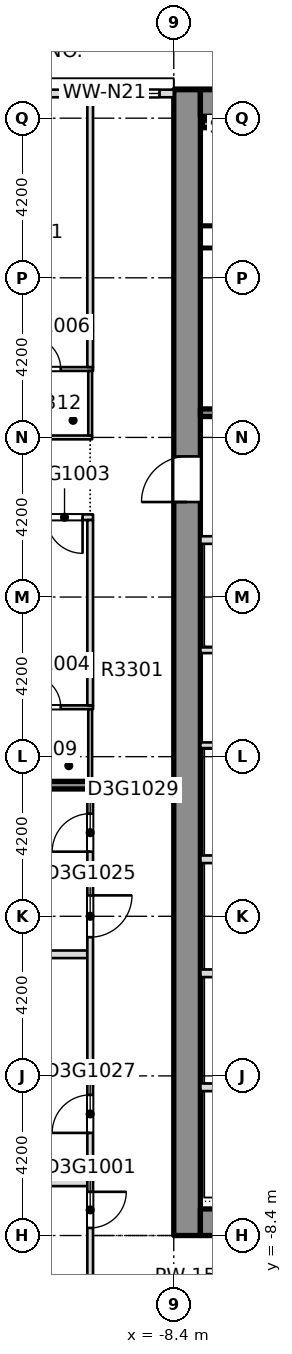
"""IFC4 building model, lengths in metres.
Left out: names, types, materials, properties, quantities, classifications, styles, units other than length and angle.
Written with IfcOpenShell. Run it as: python <this file> out.ifc"""

import sys

from ifc_helpers import new_model, si_unit, direction, frame, frame_2d, origin, place, context, subcontext, project, spatial, rectangle, extrude, element, fill, save


model = new_model("IFC4")
c1 = context("Model", 3, precision=1e-05, world=origin(), true_north=direction((0.0, 1.0)))
c2 = subcontext(c1, "Body", "Model", "MODEL_VIEW")
j1 = project(units=[si_unit("LENGTHUNIT", "METRE"), si_unit("PLANEANGLEUNIT", "RADIAN")], contexts=[c1])
p1 = place(None, origin())
s1 = spatial("IfcSite", under=j1, at=p1, CompositionType="ELEMENT")
p2 = place(p1, origin())
s2 = spatial("IfcBuilding", under=s1, at=p2, CompositionType="ELEMENT")
p3 = place(p2, frame((0.0, 0.0, 133.1)))
s3 = spatial("IfcBuildingStorey", under=s2, at=p3, CompositionType="ELEMENT", Elevation=133.1)
p4 = place(p3, frame((-8.05, -8.4, -0.4), z_axis=(0.0, 0.0, 1.0), x_axis=(0.0, 1.0, 0.0)))
e1 = element("IfcWall", 1, at=p4, inside=s3, PredefinedType="SOLIDWALL", context=c2, shape_type="SweptSolid", body=[
    extrude(rectangle(XDim=30.15, YDim=0.7, at=frame_2d((15.075, 0.0))), origin(), (0.0, 0.0, 1.0), 3.45),
])
p5 = place(p4, frame((19.3, 0.0, 0.4)))
e2 = element("IfcOpeningElement", 2, at=p5, cuts=e1, PredefinedType="OPENING", context=c2, shape_type="SweptSolid", body=[
    extrude(rectangle(XDim=1.2, YDim=2.1, at=frame_2d((0.6, 1.05))), frame((0.0, 0.36, 0.0), z_axis=(0.0, -1.0, 0.0), x_axis=(1.0, 0.0, 0.0)), (0.0, 0.0, 1.0), 0.72),
])
p6 = place(p3, frame((-7.7, -8.05, -0.4), z_axis=(0.0, 0.0, 1.0), x_axis=(1.0, 0.0, 0.0)))
e3 = element("IfcWall", 3, at=p6, inside=s3, PredefinedType="SHEAR", context=c2, shape_type="SweptSolid", body=[
    extrude(rectangle(XDim=15.4, YDim=0.7, at=frame_2d((7.7, 0.0))), origin(), (0.0, 0.0, 1.0), 3.45),
])
p7 = place(p6, frame((2.95, 0.0, 0.4)))
e4 = element("IfcOpeningElement", 4, at=p7, cuts=e3, PredefinedType="OPENING", context=c2, shape_type="SweptSolid", body=[
    extrude(rectangle(XDim=1.8, YDim=2.1, at=frame_2d((0.9, 1.05))), frame((0.0, 0.36, 0.0), z_axis=(0.0, -1.0, 0.0), x_axis=(1.0, 0.0, 0.0)), (0.0, 0.0, 1.0), 0.72),
])
p8 = place(p6, frame((10.65, 0.0, 0.4)))
e5 = element("IfcOpeningElement", 5, at=p8, cuts=e3, PredefinedType="OPENING", context=c2, shape_type="SweptSolid", body=[
    extrude(rectangle(XDim=1.8, YDim=2.1, at=frame_2d((0.9, 1.05))), frame((0.0, 0.36, 0.0), z_axis=(0.0, -1.0, 0.0), x_axis=(1.0, 0.0, 0.0)), (0.0, 0.0, 1.0), 0.72),
])
p9 = place(p3, frame((-7.7, 21.4, -0.4), z_axis=(0.0, 0.0, 1.0), x_axis=(1.0, 0.0, 0.0)))
e6 = element("IfcWall", 6, at=p9, inside=s3, PredefinedType="SHEAR", context=c2, shape_type="SweptSolid", body=[
    extrude(rectangle(XDim=15.4, YDim=0.7, at=frame_2d((7.7, 0.0))), origin(), (0.0, 0.0, 1.0), 3.45),
])
p10 = place(p3, frame((-21.55, -7.0, 0.0), z_axis=(0.0, 0.0, 1.0), x_axis=(1.0, 0.0, 0.0)))
e7 = element("IfcWall", 7, at=p10, inside=s3, PredefinedType="PARTITIONING", context=c2, shape_type="SweptSolid", body=[
    extrude(rectangle(XDim=10.875, YDim=0.2, at=frame_2d((5.438, 0.0))), origin(), (0.0, 0.0, 1.0), 3.05),
])
p11 = place(p3, frame((-16.748, -1.0, 0.0), z_axis=(0.0, 0.0, 1.0), x_axis=(1.0, 0.0, 0.0)))
e8 = element("IfcWall", 8, at=p11, inside=s3, PredefinedType="PARTITIONING", context=c2, shape_type="SweptSolid", body=[
    extrude(rectangle(XDim=6.071, YDim=0.2, at=frame_2d((3.036, 0.0))), origin(), (0.0, 0.0, 1.0), 3.05),
])
p12 = place(p3, frame((-16.75, 1.0, 0.0), z_axis=(0.0, 0.0, 1.0), x_axis=(1.0, 0.0, 0.0)))
e9 = element("IfcWall", 9, at=p12, inside=s3, PredefinedType="PARTITIONING", context=c2, shape_type="SweptSolid", body=[
    extrude(rectangle(XDim=6.075, YDim=0.2, at=frame_2d((3.038, 0.0))), origin(), (0.0, 0.0, 1.0), 3.05),
])
p13 = place(p3, frame((-13.05, 3.45, 0.0), z_axis=(0.0, 0.0, 1.0), x_axis=(1.0, 0.0, 0.0)))
e10 = element("IfcWall", 10, at=p13, inside=s3, PredefinedType="SOLIDWALL", context=c2, shape_type="SweptSolid", body=[
    extrude(rectangle(XDim=2.525, YDim=0.2, at=frame_2d((1.263, 0.0))), origin(), (0.0, 0.0, 1.0), 3.05),
])
p14 = place(p3, frame((-13.05, 5.5, 0.0), z_axis=(0.0, 0.0, 1.0), x_axis=(1.0, 0.0, 0.0)))
e11 = element("IfcWall", 11, at=p14, inside=s3, PredefinedType="PARTITIONING", context=c2, shape_type="SweptSolid", body=[
    extrude(rectangle(XDim=2.525, YDim=0.1, at=frame_2d((1.263, 0.0))), origin(), (0.0, 0.0, 1.0), 3.05),
])
p15 = place(p14, frame((0.825, 0.0, 0.0)))
e12 = element("IfcOpeningElement", 12, at=p15, cuts=e11, PredefinedType="OPENING", context=c2, shape_type="SweptSolid", body=[
    extrude(rectangle(XDim=0.85, YDim=2.1, at=frame_2d((0.425, 1.05))), frame((0.0, 0.06, 0.0), z_axis=(0.0, -1.0, 0.0), x_axis=(1.0, 0.0, 0.0)), (0.0, 0.0, 1.0), 0.12),
])
p16 = place(p3, frame((-21.55, 10.5, 0.0), z_axis=(0.0, 0.0, 1.0), x_axis=(1.0, 0.0, 0.0)))
e13 = element("IfcWall", 13, at=p16, inside=s3, PredefinedType="PARTITIONING", context=c2, shape_type="SweptSolid", body=[
    extrude(rectangle(XDim=11.025, YDim=0.15, at=frame_2d((5.513, 0.0))), origin(), (0.0, 0.0, 1.0), 3.05),
])
p17 = place(p16, frame((9.8, 0.0, 0.0)))
e14 = element("IfcOpeningElement", 14, at=p17, cuts=e13, PredefinedType="OPENING", context=c2, shape_type="SweptSolid", body=[
    extrude(rectangle(XDim=0.95, YDim=2.1, at=frame_2d((0.475, 1.05))), frame((0.0, 0.085, 0.0), z_axis=(0.0, -1.0, 0.0), x_axis=(1.0, 0.0, 0.0)), (0.0, 0.0, 1.0), 0.17),
])
p18 = place(p3, frame((-13.05, 12.6, 0.0), z_axis=(0.0, 0.0, 1.0), x_axis=(1.0, 0.0, 0.0)))
e15 = element("IfcWall", 15, at=p18, inside=s3, PredefinedType="PARTITIONING", context=c2, shape_type="SweptSolid", body=[
    extrude(rectangle(XDim=2.5, YDim=0.1, at=frame_2d((1.25, 0.0))), origin(), (0.0, 0.0, 1.0), 3.05),
])
p19 = place(p3, frame((-13.05, 14.4, 0.0), z_axis=(0.0, 0.0, 1.0), x_axis=(1.0, 0.0, 0.0)))
e16 = element("IfcWall", 16, at=p19, inside=s3, PredefinedType="PARTITIONING", context=c2, shape_type="SweptSolid", body=[
    extrude(rectangle(XDim=2.525, YDim=0.1, at=frame_2d((1.263, 0.0))), origin(), (0.0, 0.0, 1.0), 3.05),
])
p20 = place(p19, frame((0.825, 0.0, 0.0)))
e17 = element("IfcOpeningElement", 17, at=p20, cuts=e16, PredefinedType="OPENING", context=c2, shape_type="SweptSolid", body=[
    extrude(rectangle(XDim=0.85, YDim=2.1, at=frame_2d((0.425, 1.05))), frame((0.0, 0.06, 0.0), z_axis=(0.0, -1.0, 0.0), x_axis=(1.0, 0.0, 0.0)), (0.0, 0.0, 1.0), 0.12),
])
p21 = place(p3, frame((-10.6, -10.525, 0.0), z_axis=(0.0, 0.0, 1.0), x_axis=(0.0, 1.0, 0.0)))
e18 = element("IfcWall", 18, at=p21, inside=s3, PredefinedType="PARTITIONING", context=c2, shape_type="SweptSolid", body=[
    extrude(rectangle(XDim=13.875, YDim=0.15, at=frame_2d((6.938, 0.0))), origin(), (0.0, 0.0, 1.0), 3.05),
])
p22 = place(p21, frame((2.325, 0.0, 0.0)))
e19 = element("IfcOpeningElement", 19, at=p22, cuts=e18, PredefinedType="OPENING", context=c2, shape_type="SweptSolid", body=[
    extrude(rectangle(XDim=0.95, YDim=2.1, at=frame_2d((0.475, 1.05))), frame((0.0, 0.085, 0.0), z_axis=(0.0, -1.0, 0.0), x_axis=(1.0, 0.0, 0.0)), (0.0, 0.0, 1.0), 0.17),
])
p23 = place(p21, frame((9.975, 0.0, 0.0)))
e20 = element("IfcOpeningElement", 20, at=p23, cuts=e18, PredefinedType="OPENING", context=c2, shape_type="SweptSolid", body=[
    extrude(rectangle(XDim=1.1, YDim=2.1, at=frame_2d((0.55, 1.05))), frame((0.0, 0.085, 0.0), z_axis=(0.0, -1.0, 0.0), x_axis=(1.0, 0.0, 0.0)), (0.0, 0.0, 1.0), 0.17),
])
p24 = place(p21, frame((4.825, 0.0, 0.0)))
e21 = element("IfcOpeningElement", 21, at=p24, cuts=e18, PredefinedType="OPENING", context=c2, shape_type="SweptSolid", body=[
    extrude(rectangle(XDim=1.0, YDim=2.1, at=frame_2d((0.5, 1.05))), frame((0.0, 0.085, 0.0), z_axis=(0.0, -1.0, 0.0), x_axis=(1.0, 0.0, 0.0)), (0.0, 0.0, 1.0), 0.17),
])
p25 = place(p21, frame((12.225, 0.0, 0.0)))
e22 = element("IfcOpeningElement", 22, at=p25, cuts=e18, PredefinedType="OPENING", context=c2, shape_type="SweptSolid", body=[
    extrude(rectangle(XDim=1.0, YDim=2.1, at=frame_2d((0.5, 1.05))), frame((0.0, 0.085, 0.0), z_axis=(0.0, -1.0, 0.0), x_axis=(1.0, 0.0, 0.0)), (0.0, 0.0, 1.0), 0.17),
])
p26 = place(p3, frame((-10.6, 3.45, 0.0), z_axis=(0.0, 0.0, 1.0), x_axis=(0.0, 1.0, 0.0)))
e23 = element("IfcWall", 23, at=p26, inside=s3, PredefinedType="PARTITIONING", context=c2, shape_type="SweptSolid", body=[
    extrude(rectangle(XDim=2.0, YDim=0.1, at=frame_2d((1.0, 0.0))), origin(), (0.0, 0.0, 1.0), 3.05),
])
p27 = place(p3, frame((-10.6, 5.55, 0.0), z_axis=(0.0, 0.0, 1.0), x_axis=(0.0, 1.0, 0.0)))
e24 = element("IfcWall", 24, at=p27, inside=s3, PredefinedType="PARTITIONING", context=c2, shape_type="SweptSolid", body=[
    extrude(rectangle(XDim=4.875, YDim=0.15, at=frame_2d((2.438, 0.0))), origin(), (0.0, 0.0, 1.0), 3.05),
])
p28 = place(p3, frame((-10.6, 12.65, 0.0), z_axis=(0.0, 0.0, 1.0), x_axis=(0.0, 1.0, 0.0)))
e25 = element("IfcWall", 25, at=p28, inside=s3, PredefinedType="PARTITIONING", context=c2, shape_type="SweptSolid", body=[
    extrude(rectangle(XDim=1.7, YDim=0.1, at=frame_2d((0.85, 0.0))), origin(), (0.0, 0.0, 1.0), 3.05),
])
p29 = place(p3, frame((-10.6, 14.45, 0.0), z_axis=(0.0, 0.0, 1.0), x_axis=(0.0, 1.0, 0.0)))
e26 = element("IfcWall", 26, at=p29, inside=s3, PredefinedType="PARTITIONING", context=c2, shape_type="SweptSolid", body=[
    extrude(rectangle(XDim=7.1, YDim=0.15, at=frame_2d((3.55, 0.0))), origin(), (0.0, 0.0, 1.0), 3.05),
])
p30 = place(p3, frame((-8.4, 21.65, 0.0), z_axis=(0.0, 0.0, 1.0), x_axis=(-1.0, 0.0, 0.0)))
e27 = element("IfcWall", 27, at=p30, inside=s3, PredefinedType="STANDARD", context=c2, shape_type="SweptSolid", body=[
    extrude(rectangle(XDim=3.65, YDim=0.2, at=frame_2d((1.825, 0.0))), origin(), (0.0, 0.0, 1.0), 3.05),
])
p31 = place(p30, frame((0.375, 0.0, 0.2)))
e28 = element("IfcOpeningElement", 28, at=p31, cuts=e27, PredefinedType="OPENING", context=c2, shape_type="SweptSolid", body=[
    extrude(rectangle(XDim=1.8, YDim=2.65, at=frame_2d((0.9, 1.325))), frame((0.0, 0.11, 0.0), z_axis=(0.0, -1.0, 0.0), x_axis=(1.0, 0.0, 0.0)), (0.0, 0.0, 1.0), 0.22),
])
for number, where, z_axis, x_axis in (
    (29, (-7.699, -4.5, 0.0), (0.0, 0.0, 1.0), (1.0, 0.0, 0.0)),
    (30, (-7.699, -1.5, 0.0), (0.0, 0.0, 1.0), (1.0, 0.0, 0.0)),
    (31, (-7.699, 1.5, 0.0), (0.0, 0.0, 1.0), (1.0, 0.0, 0.0)),
):
    element("IfcWall", number, at=place(p3, frame(where, z_axis=z_axis, x_axis=x_axis)), inside=s3, PredefinedType="PARTITIONING", context=c2, shape_type="SweptSolid", body=[
        extrude(rectangle(XDim=2.124, YDim=0.2, at=frame_2d((1.062, 0.0))), origin(), (0.0, 0.0, 1.0), 3.05),
    ])
p32 = place(p3, frame((-7.699, 4.5, 0.0), z_axis=(0.0, 0.0, 1.0), x_axis=(1.0, 0.0, 0.0)))
e32 = element("IfcWall", 32, at=p32, inside=s3, PredefinedType="PARTITIONING", context=c2, shape_type="SweptSolid", body=[
    extrude(rectangle(XDim=2.274, YDim=0.15, at=frame_2d((1.137, 0.0))), origin(), (0.0, 0.0, 1.0), 3.05),
])
p33 = place(p3, frame((-7.699, 7.0, 0.0), z_axis=(0.0, 0.0, 1.0), x_axis=(1.0, 0.0, 0.0)))
e33 = element("IfcWall", 33, at=p33, inside=s3, PredefinedType="PARTITIONING", context=c2, shape_type="SweptSolid", body=[
    extrude(rectangle(XDim=15.398, YDim=0.15, at=frame_2d((7.699, 0.0))), origin(), (0.0, 0.0, 1.0), 3.05),
])
p34 = place(p33, frame((6.999, 0.0, 0.0)))
e34 = element("IfcOpeningElement", 34, at=p34, cuts=e33, PredefinedType="OPENING", context=c2, shape_type="SweptSolid", body=[
    extrude(rectangle(XDim=1.4, YDim=2.1, at=frame_2d((0.7, 1.05))), frame((0.0, 0.085, 0.0), z_axis=(0.0, -1.0, 0.0), x_axis=(1.0, 0.0, 0.0)), (0.0, 0.0, 1.0), 0.17),
])
p35 = place(p3, frame((-7.699, 9.9, 0.0), z_axis=(0.0, 0.0, 1.0), x_axis=(1.0, 0.0, 0.0)))
e35 = element("IfcWall", 35, at=p35, inside=s3, PredefinedType="PARTITIONING", context=c2, shape_type="SweptSolid", body=[
    extrude(rectangle(XDim=4.099, YDim=0.2, at=frame_2d((2.049, 0.0))), origin(), (0.0, 0.0, 1.0), 3.05),
])
p36 = place(p35, frame((0.749, 0.0, 0.0)))
e36 = element("IfcOpeningElement", 36, at=p36, cuts=e35, PredefinedType="OPENING", context=c2, shape_type="SweptSolid", body=[
    extrude(rectangle(XDim=1.1, YDim=2.1, at=frame_2d((0.55, 1.05))), frame((0.0, 0.11, 0.0), z_axis=(0.0, -1.0, 0.0), x_axis=(1.0, 0.0, 0.0)), (0.0, 0.0, 1.0), 0.22),
])
p37 = place(p3, frame((-7.699, 13.25, 0.0), z_axis=(0.0, 0.0, 1.0), x_axis=(1.0, 0.0, 0.0)))
e37 = element("IfcWall", 37, at=p37, inside=s3, PredefinedType="SOLIDWALL", context=c2, shape_type="SweptSolid", body=[
    extrude(rectangle(XDim=4.274, YDim=0.2, at=frame_2d((2.137, 0.0))), origin(), (0.0, 0.0, 1.0), 3.05),
])
p38 = place(p37, frame((1.249, 0.0, 0.0)))
e38 = element("IfcOpeningElement", 38, at=p38, cuts=e37, PredefinedType="OPENING", context=c2, shape_type="SweptSolid", body=[
    extrude(rectangle(XDim=1.2, YDim=2.1, at=frame_2d((0.6, 1.05))), frame((0.0, 0.11, 0.0), z_axis=(0.0, -1.0, 0.0), x_axis=(1.0, 0.0, 0.0)), (0.0, 0.0, 1.0), 0.22),
])
p39 = place(p3, frame((-7.65, 20.85, 0.0), z_axis=(0.0, 0.0, 1.0), x_axis=(1.0, 0.0, 0.0)))
e39 = element("IfcWall", 39, at=p39, inside=s3, PredefinedType="SOLIDWALL", context=c2, shape_type="SweptSolid", body=[
    extrude(rectangle(XDim=3.5, YDim=0.2, at=frame_2d((1.75, 0.0))), origin(), (0.0, 0.0, 1.0), 3.05),
])
p40 = place(p22, origin())
e40 = element("IfcDoor", 40, at=p40, inside=s3, OperationType="SINGLE_SWING_RIGHT", PredefinedType="DOOR", context=c2, shape_type="SweptSolid", body=[
    extrude(rectangle(XDim=0.95, YDim=2.1, at=frame_2d((0.475, 1.05))), frame((0.0, 0.025, 0.0), z_axis=(0.0, -1.0, 0.0), x_axis=(1.0, 0.0, 0.0)), (0.0, 0.0, 1.0), 0.05),
])
fill(e19, e40)
p41 = place(p17, origin())
e41 = element("IfcDoor", 41, at=p41, inside=s3, OperationType="SINGLE_SWING_RIGHT", PredefinedType="DOOR", context=c2, shape_type="SweptSolid", body=[
    extrude(rectangle(XDim=0.95, YDim=2.1, at=frame_2d((0.475, 1.05))), frame((0.0, 0.025, 0.0), z_axis=(0.0, -1.0, 0.0), x_axis=(1.0, 0.0, 0.0)), (0.0, 0.0, 1.0), 0.05),
])
fill(e14, e41)
p42 = place(p15, origin())
e42 = element("IfcDoor", 42, at=p42, inside=s3, OperationType="SINGLE_SWING_RIGHT", PredefinedType="DOOR", context=c2, shape_type="SweptSolid", body=[
    extrude(rectangle(XDim=0.85, YDim=2.1, at=frame_2d((0.425, 1.05))), frame((0.0, 0.025, 0.0), z_axis=(0.0, -1.0, 0.0), x_axis=(1.0, 0.0, 0.0)), (0.0, 0.0, 1.0), 0.05),
])
fill(e12, e42)
p43 = place(p20, origin())
e43 = element("IfcDoor", 43, at=p43, inside=s3, OperationType="SINGLE_SWING_RIGHT", PredefinedType="DOOR", context=c2, shape_type="SweptSolid", body=[
    extrude(rectangle(XDim=0.85, YDim=2.1, at=frame_2d((0.425, 1.05))), frame((0.0, 0.025, 0.0), z_axis=(0.0, -1.0, 0.0), x_axis=(1.0, 0.0, 0.0)), (0.0, 0.0, 1.0), 0.05),
])
fill(e17, e43)
p44 = place(p23, origin())
e44 = element("IfcDoor", 44, at=p44, inside=s3, OperationType="SINGLE_SWING_RIGHT", PredefinedType="DOOR", context=c2, shape_type="SweptSolid", body=[
    extrude(rectangle(XDim=1.1, YDim=2.1, at=frame_2d((0.55, 1.05))), frame((0.0, 0.025, 0.0), z_axis=(0.0, -1.0, 0.0), x_axis=(1.0, 0.0, 0.0)), (0.0, 0.0, 1.0), 0.05),
])
fill(e20, e44)
p45 = place(p24, origin())
e45 = element("IfcDoor", 45, at=p45, inside=s3, OperationType="SINGLE_SWING_RIGHT", PredefinedType="DOOR", context=c2, shape_type="SweptSolid", body=[
    extrude(rectangle(XDim=1.0, YDim=2.1, at=frame_2d((0.5, 1.05))), frame((0.0, 0.025, 0.0), z_axis=(0.0, -1.0, 0.0), x_axis=(1.0, 0.0, 0.0)), (0.0, 0.0, 1.0), 0.05),
])
fill(e21, e45)
p46 = place(p25, origin())
e46 = element("IfcDoor", 46, at=p46, inside=s3, OperationType="SINGLE_SWING_RIGHT", PredefinedType="DOOR", context=c2, shape_type="SweptSolid", body=[
    extrude(rectangle(XDim=1.0, YDim=2.1, at=frame_2d((0.5, 1.05))), frame((0.0, 0.025, 0.0), z_axis=(0.0, -1.0, 0.0), x_axis=(1.0, 0.0, 0.0)), (0.0, 0.0, 1.0), 0.05),
])
fill(e22, e46)
p47 = place(p31, origin())
e47 = element("IfcWindow", 47, at=p47, inside=s3, PartitioningType="SINGLE_PANEL", PredefinedType="WINDOW", context=c2, shape_type="SweptSolid", body=[
    extrude(rectangle(XDim=1.8, YDim=2.65, at=frame_2d((0.9, 1.325))), frame((0.0, 0.03, 0.0), z_axis=(0.0, -1.0, 0.0), x_axis=(1.0, 0.0, 0.0)), (0.0, 0.0, 1.0), 0.06),
])
fill(e28, e47)
p48 = place(p5, origin())
e48 = element("IfcDoor", 48, at=p48, inside=s3, OperationType="SINGLE_SWING_LEFT", PredefinedType="DOOR", context=c2, shape_type="SweptSolid", body=[
    extrude(rectangle(XDim=1.2, YDim=2.1, at=frame_2d((0.6, 1.05))), frame((0.0, 0.025, 0.0), z_axis=(0.0, -1.0, 0.0), x_axis=(1.0, 0.0, 0.0)), (0.0, 0.0, 1.0), 0.05),
])
fill(e2, e48)
save(model, sys.argv[1])
